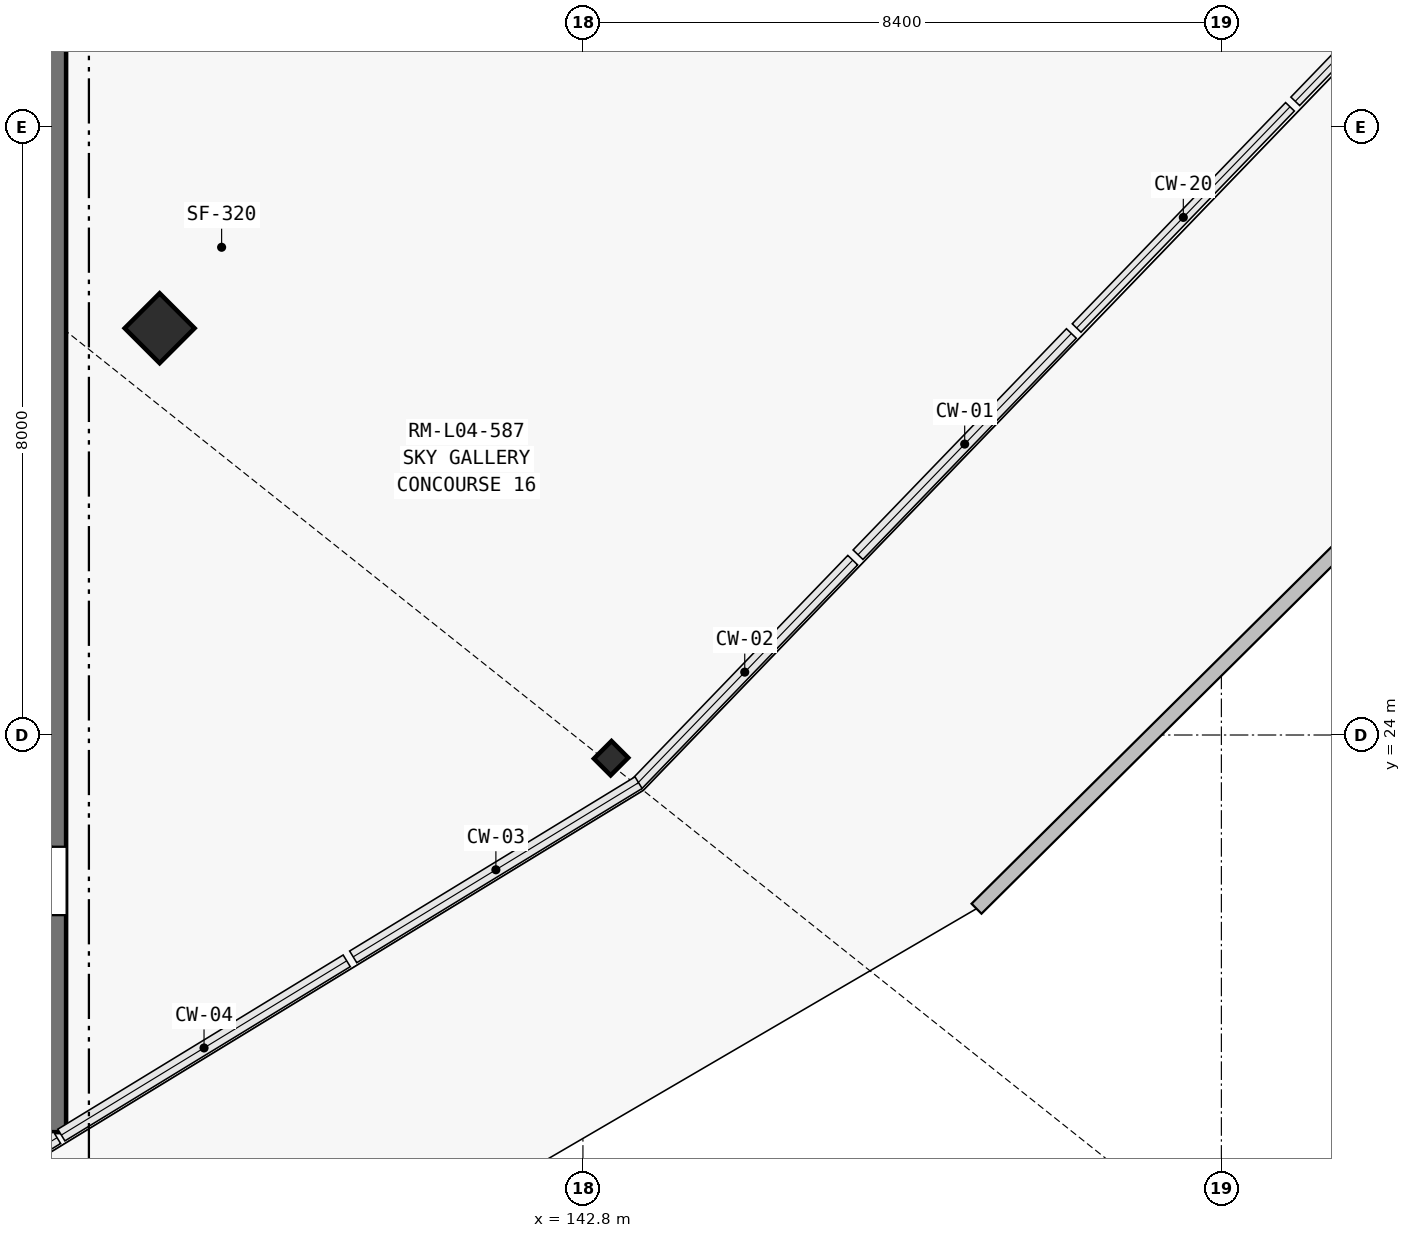
"""IFC4 building model, lengths in metres.
Left out: names, types, materials, properties, quantities, classifications, styles, units other than length and angle.
Written with IfcOpenShell. Run it as: python <this file> out.ifc"""

import sys

from ifc_helpers import new_model, si_unit, direction, frame, frame_2d, origin, origin_2d, place, context, subcontext, project, spatial, rectangle, i_section, extrude, element, fill, save


model = new_model("IFC4")
c1 = context("Model", 3, precision=1e-05, world=origin(), true_north=direction((0.0, 1.0)))
c2 = subcontext(c1, "Body", "Model", "MODEL_VIEW")
j1 = project(units=[si_unit("LENGTHUNIT", "METRE"), si_unit("PLANEANGLEUNIT", "RADIAN")], contexts=[c1])
p1 = place(None, origin())
s1 = spatial("IfcSite", under=j1, at=p1, CompositionType="ELEMENT")
p2 = place(p1, origin())
s2 = spatial("IfcBuilding", under=s1, at=p2, CompositionType="ELEMENT")
p3 = place(p2, frame((0.0, 0.0, 18.9)))
s3 = spatial("IfcBuildingStorey", under=s2, at=p3, CompositionType="ELEMENT", Elevation=18.9)
p4 = place(p3, frame((137.231, 29.352, 0.0), z_axis=(0.0, 0.0, 1.0), x_axis=(0.707106781187, -0.707106781187, 0.0)))
e1 = element("IfcColumn", 1, at=p4, inside=s3, PredefinedType="COLUMN", context=c2, shape_type="SweptSolid", body=[
    extrude(rectangle(XDim=0.65, YDim=0.65, at=origin_2d()), origin(), (0.0, 0.0, 1.0), 4.5),
])
p5 = place(p3, frame((143.17, 23.695, 0.0), z_axis=(0.0, 0.0, 1.0), x_axis=(0.707106781187, -0.707106781187, 0.0)))
e2 = element("IfcColumn", 2, at=p5, inside=s3, PredefinedType="COLUMN", context=c2, shape_type="SweptSolid", body=[
    extrude(i_section(OverallWidth=0.311, OverallDepth=0.327, WebThickness=0.016, FlangeThickness=0.025, at=origin_2d()), origin(), (0.0, 0.0, 1.0), 4.5),
])
p6 = place(p3, frame((160.469, 34.1, 0.0), z_axis=(0.0, 0.0, 1.0), x_axis=(-0.710112198636, -0.704088535164, 0.0)))
e3 = element("IfcWall", 3, at=p6, inside=s3, PredefinedType="PARAPET", context=c2, shape_type="SweptSolid", body=[
    extrude(rectangle(XDim=17.59, YDim=0.185, at=frame_2d((8.795, 0.0))), origin(), (0.0, 0.0, 1.0), 0.85),
])
p7 = place(p3, frame((127.775, 18.775, 0.0), z_axis=(0.0, 0.0, 1.0), x_axis=(1.0, 0.0, 0.0)))
e4 = element("IfcWall", 4, at=p7, inside=s3, PredefinedType="SHEAR", context=c2, shape_type="SweptSolid", body=[
    extrude(rectangle(XDim=8.05, YDim=0.35, at=frame_2d((4.025, 0.0))), origin(), (0.0, 0.0, 1.0), 4.5),
])
p8 = place(p3, frame((135.825, 18.775, 0.0), z_axis=(0.0, 0.0, 1.0), x_axis=(0.0, 1.0, 0.0)))
e5 = element("IfcWall", 5, at=p8, inside=s3, PredefinedType="SHEAR", context=c2, shape_type="SweptSolid", body=[
    extrude(rectangle(XDim=14.85, YDim=0.35, at=frame_2d((7.425, 0.0))), origin(), (0.0, 0.0, 1.0), 4.5),
])
p9 = place(p8, frame((2.855, 0.0, 0.0)))
e6 = element("IfcOpeningElement", 6, at=p9, cuts=e5, PredefinedType="OPENING", context=c2, shape_type="SweptSolid", body=[
    extrude(rectangle(XDim=0.9, YDim=2.1, at=frame_2d((0.45, 1.05))), frame((0.0, 0.185, 0.0), z_axis=(0.0, -1.0, 0.0), x_axis=(1.0, 0.0, 0.0)), (0.0, 0.0, 1.0), 0.37),
])
p10 = place(p9, origin())
e7 = element("IfcDoor", 7, at=p10, inside=s3, OperationType="SINGLE_SWING_RIGHT", PredefinedType="DOOR", context=c2, shape_type="SweptSolid", body=[
    extrude(rectangle(XDim=0.9, YDim=2.1, at=frame_2d((0.45, 1.05))), frame((0.0, 0.025, 0.0), z_axis=(0.0, -1.0, 0.0), x_axis=(1.0, 0.0, 0.0)), (0.0, 0.0, 1.0), 0.05),
])
fill(e6, e7)
save(model, sys.argv[1])
